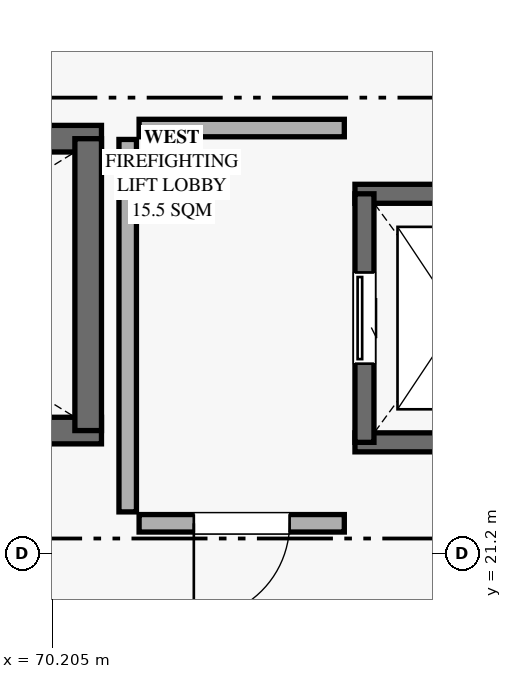
"""IFC4 building model, lengths in metres.
Left out: names, types, materials, properties, quantities, classifications, styles, units other than length and angle.
Written with IfcOpenShell. Run it as: python <this file> out.ifc"""

import sys

from ifc_helpers import new_model, si_unit, direction, frame, frame_2d, origin, place, context, subcontext, project, spatial, rectangle, extrude, element, fill, save


model = new_model("IFC4")
c1 = context("Model", 3, precision=1e-05, world=origin(), true_north=direction((0.0, 1.0)))
c2 = subcontext(c1, "Body", "Model", "MODEL_VIEW")
j1 = project(units=[si_unit("LENGTHUNIT", "METRE"), si_unit("PLANEANGLEUNIT", "RADIAN")], contexts=[c1])
p1 = place(None, origin())
s1 = spatial("IfcSite", under=j1, at=p1, CompositionType="ELEMENT")
p2 = place(p1, origin())
s2 = spatial("IfcBuilding", under=s1, at=p2, CompositionType="ELEMENT")
p3 = place(p2, frame((0.0, 0.0, 19.8)))
s3 = spatial("IfcBuildingStorey", under=s2, at=p3, CompositionType="ELEMENT", Elevation=19.8)
for number, where, z_axis, x_axis in (
    (1, (70.855, 22.82, 0.0), (0.0, 0.0, 1.0), (-1.0, 0.0, 0.0)),
    (2, (62.845, 26.66, 0.0), (0.0, 0.0, 1.0), (1.0, 0.0, 0.0)),
):
    element("IfcWall", number, at=place(p3, frame(where, z_axis=z_axis, x_axis=x_axis)), inside=s3, PredefinedType="SHEAR", context=c2, shape_type="SweptSolid", body=[
        extrude(rectangle(XDim=8.01, YDim=0.35, at=frame_2d((4.005, 0.0))), origin(), (0.0, 0.0, 1.0), 4.23),
    ])
p4 = place(p3, frame((70.68, 26.66, 0.0), z_axis=(0.0, 0.0, 1.0), x_axis=(0.0, -1.0, 0.0)))
e3 = element("IfcWall", 3, at=p4, inside=s3, PredefinedType="SHEAR", context=c2, shape_type="SweptSolid", body=[
    extrude(rectangle(XDim=3.84, YDim=0.35, at=frame_2d((1.92, 0.0))), origin(), (0.0, 0.0, 1.0), 4.23),
])
for number, where, z_axis, x_axis in (
    (4, (76.91, 22.665, 0.0), (0.0, 0.0, 1.0), (-1.0, 0.0, 0.0)),
    (5, (74.19, 25.935, 0.0), (0.0, 0.0, 1.0), (1.0, 0.0, 0.0)),
):
    element("IfcWall", number, at=place(p3, frame(where, z_axis=z_axis, x_axis=x_axis)), inside=s3, PredefinedType="SHEAR", context=c2, shape_type="SweptSolid", body=[
        extrude(rectangle(XDim=2.72, YDim=0.25, at=frame_2d((1.36, 0.0))), origin(), (0.0, 0.0, 1.0), 4.23),
    ])
p5 = place(p3, frame((74.315, 22.665, 0.0), z_axis=(0.0, 0.0, 1.0), x_axis=(0.0, 1.0, 0.0)))
e6 = element("IfcWall", 6, at=p5, inside=s3, PredefinedType="SHEAR", context=c2, shape_type="SweptSolid", body=[
    extrude(rectangle(XDim=3.27, YDim=0.25, at=frame_2d((1.635, 0.0))), origin(), (0.0, 0.0, 1.0), 4.23),
])
p6 = place(p5, frame((1.035, 0.0, 0.0)))
e7 = element("IfcOpeningElement", 7, at=p6, cuts=e6, PredefinedType="OPENING", context=c2, shape_type="SweptSolid", body=[
    extrude(rectangle(XDim=1.2, YDim=2.25, at=frame_2d((0.6, 1.125))), frame((0.0, 0.135, 0.0), z_axis=(0.0, -1.0, 0.0), x_axis=(1.0, 0.0, 0.0)), (0.0, 0.0, 1.0), 0.27),
])
p7 = place(p3, frame((74.05, 21.6, 0.0), z_axis=(0.0, 0.0, 1.0), x_axis=(-1.0, 0.0, 0.0)))
e8 = element("IfcWall", 8, at=p7, inside=s3, PredefinedType="PARTITIONING", context=c2, shape_type="SweptSolid", body=[
    extrude(rectangle(XDim=2.7, YDim=0.23, at=frame_2d((1.35, 0.0))), origin(), (0.0, 0.0, 1.0), 2.98),
])
p8 = place(p7, frame((0.72, 0.0, 0.0)))
e9 = element("IfcOpeningElement", 9, at=p8, cuts=e8, PredefinedType="OPENING", context=c2, shape_type="SweptSolid", body=[
    extrude(rectangle(XDim=1.26, YDim=2.18, at=frame_2d((0.63, 1.09))), frame((0.0, 0.125, 0.0), z_axis=(0.0, -1.0, 0.0), x_axis=(1.0, 0.0, 0.0)), (0.0, 0.0, 1.0), 0.25),
])
p9 = place(p3, frame((71.35, 26.8, 0.0), z_axis=(0.0, 0.0, 1.0), x_axis=(1.0, 0.0, 0.0)))
e10 = element("IfcWall", 10, at=p9, inside=s3, PredefinedType="PARTITIONING", context=c2, shape_type="SweptSolid", body=[
    extrude(rectangle(XDim=2.7, YDim=0.23, at=frame_2d((1.35, 0.0))), origin(), (0.0, 0.0, 1.0), 2.98),
])
p10 = place(p3, frame((71.2, 21.75, 0.0), z_axis=(0.0, 0.0, 1.0), x_axis=(0.0, 1.0, 0.0)))
e11 = element("IfcWall", 11, at=p10, inside=s3, PredefinedType="PARTITIONING", context=c2, shape_type="SweptSolid", body=[
    extrude(rectangle(XDim=4.9, YDim=0.23, at=frame_2d((2.45, 0.0))), origin(), (0.0, 0.0, 1.0), 2.98),
])
p11 = place(p6, origin())
e12 = element("IfcDoor", 12, at=p11, inside=s3, OperationType="SLIDING_TO_LEFT", PredefinedType="DOOR", context=c2, shape_type="SweptSolid", body=[
    extrude(rectangle(XDim=1.2, YDim=2.25, at=frame_2d((0.6, 1.125))), frame((0.0, 0.025, 0.0), z_axis=(0.0, -1.0, 0.0), x_axis=(1.0, 0.0, 0.0)), (0.0, 0.0, 1.0), 0.05),
])
fill(e7, e12)
p12 = place(p8, origin())
e13 = element("IfcDoor", 13, at=p12, inside=s3, OperationType="SINGLE_SWING_RIGHT", PredefinedType="DOOR", context=c2, shape_type="SweptSolid", body=[
    extrude(rectangle(XDim=1.26, YDim=2.18, at=frame_2d((0.63, 1.09))), frame((0.0, 0.025, 0.0), z_axis=(0.0, -1.0, 0.0), x_axis=(1.0, 0.0, 0.0)), (0.0, 0.0, 1.0), 0.05),
])
fill(e9, e13)
save(model, sys.argv[1])
